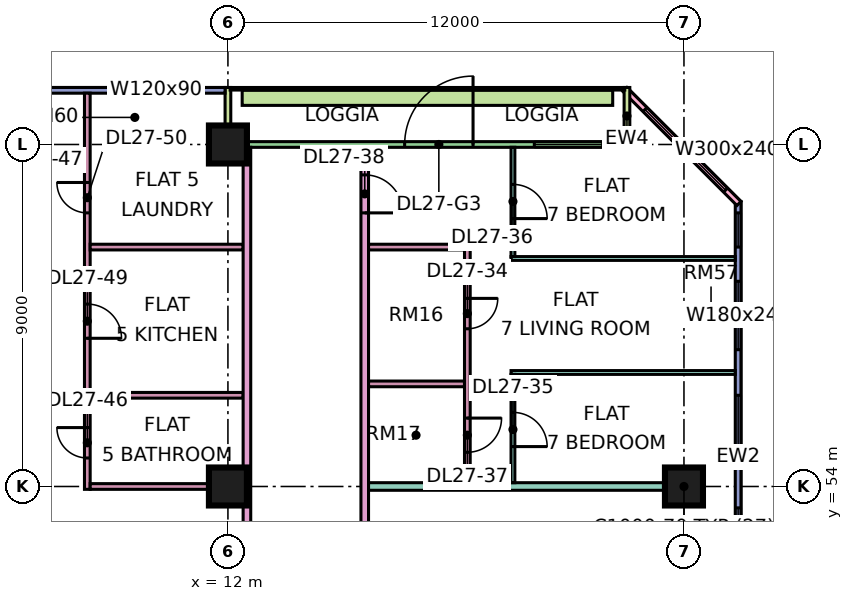
"""IFC4 building model, lengths in metres.
Left out: names, types, materials, properties, quantities, classifications, styles, units other than length and angle.
Written with IfcOpenShell. Run it as: python <this file> out.ifc"""

import sys

from ifc_helpers import new_model, si_unit, direction, frame, frame_2d, origin, origin_2d, place, context, subcontext, project, spatial, rectangle, extrude, element, fill, save


model = new_model("IFC4")
c1 = context("Model", 3, precision=1e-05, world=origin(), true_north=direction((0.0, 1.0)))
c2 = subcontext(c1, "Body", "Model", "MODEL_VIEW")
j1 = project(units=[si_unit("LENGTHUNIT", "METRE"), si_unit("PLANEANGLEUNIT", "RADIAN")], contexts=[c1])
p1 = place(None, origin())
s1 = spatial("IfcSite", under=j1, at=p1, CompositionType="ELEMENT")
p2 = place(p1, origin())
s2 = spatial("IfcBuilding", under=s1, at=p2, CompositionType="ELEMENT")
p3 = place(p2, frame((0.0, 0.0, 118.15)))
s3 = spatial("IfcBuildingStorey", under=s2, at=p3, CompositionType="ELEMENT", Elevation=118.15)
for number, where, z_axis, x_axis in (
    (1, (12.0, 54.0, 0.0), (0.0, 0.0, 1.0), (1.0, 0.0, 0.0)),
    (2, (12.0, 63.0, 0.0), (0.0, 0.0, 1.0), (1.0, 0.0, 0.0)),
    (3, (24.0, 54.0, 0.0), (0.0, 0.0, 1.0), (1.0, 0.0, 0.0)),
):
    element("IfcColumn", number, at=place(p3, frame(where, z_axis=z_axis, x_axis=x_axis)), inside=s3, PredefinedType="COLUMN", context=c2, shape_type="SweptSolid", body=[
        extrude(rectangle(XDim=1.0, YDim=1.0, at=origin_2d()), origin(), (0.0, 0.0, 1.0), 3.75),
    ])
p4 = place(p3, frame((25.425, 48.075, 0.0), z_axis=(0.0, 0.0, 1.0), x_axis=(0.0, 1.0, 0.0)))
e4 = element("IfcWall", 4, at=p4, inside=s3, PredefinedType="SOLIDWALL", context=c2, shape_type="SweptSolid", body=[
    extrude(rectangle(XDim=13.425, YDim=0.15, at=frame_2d((6.712, 0.0))), origin(), (0.0, 0.0, 1.0), 3.35),
])
p5 = place(p4, frame((0.562, 0.0, 0.45)))
e5 = element("IfcOpeningElement", 5, at=p5, cuts=e4, PredefinedType="OPENING", context=c2, shape_type="SweptSolid", body=[
    extrude(rectangle(XDim=4.8, YDim=2.4, at=frame_2d((2.4, 1.2))), frame((0.0, 0.085, 0.0), z_axis=(0.0, -1.0, 0.0), x_axis=(1.0, 0.0, 0.0)), (0.0, 0.0, 1.0), 0.17),
])
p6 = place(p4, frame((6.525, 0.0, 0.45)))
e6 = element("IfcOpeningElement", 6, at=p6, cuts=e4, PredefinedType="OPENING", context=c2, shape_type="SweptSolid", body=[
    extrude(rectangle(XDim=1.8, YDim=2.4, at=frame_2d((0.9, 1.2))), frame((0.0, 0.085, 0.0), z_axis=(0.0, -1.0, 0.0), x_axis=(1.0, 0.0, 0.0)), (0.0, 0.0, 1.0), 0.17),
])
p7 = place(p4, frame((9.525, 0.0, 0.45)))
e7 = element("IfcOpeningElement", 7, at=p7, cuts=e4, PredefinedType="OPENING", context=c2, shape_type="SweptSolid", body=[
    extrude(rectangle(XDim=1.8, YDim=2.4, at=frame_2d((0.9, 1.2))), frame((0.0, 0.085, 0.0), z_axis=(0.0, -1.0, 0.0), x_axis=(1.0, 0.0, 0.0)), (0.0, 0.0, 1.0), 0.17),
])
p8 = place(p4, frame((12.225, 0.0, 0.45)))
e8 = element("IfcOpeningElement", 8, at=p8, cuts=e4, PredefinedType="OPENING", context=c2, shape_type="SweptSolid", body=[
    extrude(rectangle(XDim=0.9, YDim=2.4, at=frame_2d((0.45, 1.2))), frame((0.0, 0.085, 0.0), z_axis=(0.0, -1.0, 0.0), x_axis=(1.0, 0.0, 0.0)), (0.0, 0.0, 1.0), 0.17),
])
p9 = place(p3, frame((25.447, 61.447, 0.0), z_axis=(0.0, 0.0, 1.0), x_axis=(-0.707106781187, 0.707106781187, 0.0)))
e9 = element("IfcWall", 9, at=p9, inside=s3, PredefinedType="SOLIDWALL", context=c2, shape_type="SweptSolid", body=[
    extrude(rectangle(XDim=4.243, YDim=0.15, at=frame_2d((2.121, 0.0))), origin(), (0.0, 0.0, 1.0), 3.35),
])
p10 = place(p9, frame((0.498, 0.0, 0.45)))
e10 = element("IfcOpeningElement", 10, at=p10, cuts=e9, PredefinedType="OPENING", context=c2, shape_type="SweptSolid", body=[
    extrude(rectangle(XDim=3.0, YDim=2.4, at=frame_2d((1.5, 1.2))), frame((0.0, 0.085, 0.0), z_axis=(0.0, -1.0, 0.0), x_axis=(1.0, 0.0, 0.0)), (0.0, 0.0, 1.0), 0.17),
])
p11 = place(p3, frame((22.425, 63.0, 0.0), z_axis=(0.0, 0.0, 1.0), x_axis=(-1.0, 0.0, 0.0)))
e11 = element("IfcWall", 11, at=p11, inside=s3, PredefinedType="SOLIDWALL", context=c2, shape_type="SweptSolid", body=[
    extrude(rectangle(XDim=10.35, YDim=0.15, at=frame_2d((5.175, 0.0))), origin(), (0.0, 0.0, 1.0), 3.35),
])
p12 = place(p11, frame((0.562, 0.0, 0.45)))
e12 = element("IfcOpeningElement", 12, at=p12, cuts=e11, PredefinedType="OPENING", context=c2, shape_type="SweptSolid", body=[
    extrude(rectangle(XDim=1.8, YDim=2.4, at=frame_2d((0.9, 1.2))), frame((0.0, 0.085, 0.0), z_axis=(0.0, -1.0, 0.0), x_axis=(1.0, 0.0, 0.0)), (0.0, 0.0, 1.0), 0.17),
])
p13 = place(p11, frame((3.975, 0.0, 0.0)))
e13 = element("IfcOpeningElement", 13, at=p13, cuts=e11, PredefinedType="OPENING", context=c2, shape_type="SweptSolid", body=[
    extrude(rectangle(XDim=1.8, YDim=2.4, at=frame_2d((0.9, 1.2))), frame((0.0, 0.085, 0.0), z_axis=(0.0, -1.0, 0.0), x_axis=(1.0, 0.0, 0.0)), (0.0, 0.0, 1.0), 0.17),
])
for number, where, z_axis, x_axis in (
    (14, (22.5, 64.5, 0.0), (0.0, 0.0, 1.0), (0.0, -1.0, 0.0)),
    (15, (12.0, 64.5, 0.0), (0.0, 0.0, 1.0), (0.0, -1.0, 0.0)),
):
    element("IfcWall", number, at=place(p3, frame(where, z_axis=z_axis, x_axis=x_axis)), inside=s3, PredefinedType="SOLIDWALL", context=c2, shape_type="SweptSolid", body=[
        extrude(rectangle(XDim=1.5, YDim=0.15, at=frame_2d((0.75, 0.0))), origin(), (0.0, 0.0, 1.0), 3.35),
    ])
p14 = place(p3, frame((11.925, 64.425, 0.0), z_axis=(0.0, 0.0, 1.0), x_axis=(-1.0, 0.0, 0.0)))
e16 = element("IfcWall", 16, at=p14, inside=s3, PredefinedType="SOLIDWALL", context=c2, shape_type="SweptSolid", body=[
    extrude(rectangle(XDim=10.425, YDim=0.15, at=frame_2d((5.212, 0.0))), origin(), (0.0, 0.0, 1.0), 3.35),
])
p15 = place(p14, frame((1.212, 0.0, 1.7)))
e17 = element("IfcOpeningElement", 17, at=p15, cuts=e16, PredefinedType="OPENING", context=c2, shape_type="SweptSolid", body=[
    extrude(rectangle(XDim=1.2, YDim=0.9, at=frame_2d((0.6, 0.45))), frame((0.0, 0.085, 0.0), z_axis=(0.0, -1.0, 0.0), x_axis=(1.0, 0.0, 0.0)), (0.0, 0.0, 1.0), 0.17),
])
p16 = place(p14, frame((6.125, 0.0, 0.45)))
e18 = element("IfcOpeningElement", 18, at=p16, cuts=e16, PredefinedType="OPENING", context=c2, shape_type="SweptSolid", body=[
    extrude(rectangle(XDim=3.0, YDim=2.4, at=frame_2d((1.5, 1.2))), frame((0.0, 0.085, 0.0), z_axis=(0.0, -1.0, 0.0), x_axis=(1.0, 0.0, 0.0)), (0.0, 0.0, 1.0), 0.17),
])
p17 = place(p3, frame((22.125, 64.229, 0.0), z_axis=(0.0, 0.0, 1.0), x_axis=(-1.0, 0.0, 0.0)))
e19 = element("IfcWall", 19, at=p17, inside=s3, PredefinedType="SOLIDWALL", context=c2, shape_type="SweptSolid", body=[
    extrude(rectangle(XDim=9.75, YDim=0.4, at=frame_2d((4.875, 0.0))), origin(), (0.0, 0.0, 1.0), 0.7),
])
p18 = place(p3, frame((8.3, 53.925, 0.0), z_axis=(0.0, 0.0, 1.0), x_axis=(0.0, 1.0, 0.0)))
e20 = element("IfcWall", 20, at=p18, inside=s3, PredefinedType="PARTITIONING", context=c2, shape_type="SweptSolid", body=[
    extrude(rectangle(XDim=10.425, YDim=0.15, at=frame_2d((5.212, 0.0))), origin(), (0.0, 0.0, 1.0), 3.35),
])
p19 = place(p18, frame((0.825, 0.0, 0.0)))
e21 = element("IfcOpeningElement", 21, at=p19, cuts=e20, PredefinedType="OPENING", context=c2, shape_type="SweptSolid", body=[
    extrude(rectangle(XDim=0.8, YDim=2.1, at=frame_2d((0.4, 1.05))), frame((0.0, 0.085, 0.0), z_axis=(0.0, -1.0, 0.0), x_axis=(1.0, 0.0, 0.0)), (0.0, 0.0, 1.0), 0.17),
])
p20 = place(p18, frame((3.975, 0.0, 0.0)))
e22 = element("IfcOpeningElement", 22, at=p20, cuts=e20, PredefinedType="OPENING", context=c2, shape_type="SweptSolid", body=[
    extrude(rectangle(XDim=0.9, YDim=2.1, at=frame_2d((0.45, 1.05))), frame((0.0, 0.085, 0.0), z_axis=(0.0, -1.0, 0.0), x_axis=(1.0, 0.0, 0.0)), (0.0, 0.0, 1.0), 0.17),
])
p21 = place(p18, frame((7.275, 0.0, 0.0)))
e23 = element("IfcOpeningElement", 23, at=p21, cuts=e20, PredefinedType="OPENING", context=c2, shape_type="SweptSolid", body=[
    extrude(rectangle(XDim=0.8, YDim=2.1, at=frame_2d((0.4, 1.05))), frame((0.0, 0.085, 0.0), z_axis=(0.0, -1.0, 0.0), x_axis=(1.0, 0.0, 0.0)), (0.0, 0.0, 1.0), 0.17),
])
for number, where, z_axis, x_axis in (
    (24, (8.375, 54.0, 0.0), (0.0, 0.0, 1.0), (1.0, 0.0, 0.0)),
    (25, (8.375, 56.4, 0.0), (0.0, 0.0, 1.0), (1.0, 0.0, 0.0)),
    (26, (8.375, 60.3, 0.0), (0.0, 0.0, 1.0), (1.0, 0.0, 0.0)),
):
    element("IfcWall", number, at=place(p3, frame(where, z_axis=z_axis, x_axis=x_axis)), inside=s3, PredefinedType="PARTITIONING", context=c2, shape_type="SweptSolid", body=[
        extrude(rectangle(XDim=4.025, YDim=0.15, at=frame_2d((2.012, 0.0))), origin(), (0.0, 0.0, 1.0), 3.35),
    ])
p22 = place(p3, frame((12.5, 20.0, 0.0), z_axis=(0.0, 0.0, 1.0), x_axis=(0.0, 1.0, 0.0)))
e27 = element("IfcWall", 27, at=p22, inside=s3, PredefinedType="PARTITIONING", context=c2, shape_type="SweptSolid", body=[
    extrude(rectangle(XDim=42.926, YDim=0.2, at=frame_2d((21.463, 0.0))), origin(), (0.0, 0.0, 1.0), 3.35),
])
p23 = place(p22, frame((28.65, 0.0, 0.0)))
e28 = element("IfcOpeningElement", 28, at=p23, cuts=e27, PredefinedType="OPENING", context=c2, shape_type="SweptSolid", body=[
    extrude(rectangle(XDim=1.0, YDim=2.1, at=frame_2d((0.5, 1.05))), frame((0.0, 0.11, 0.0), z_axis=(0.0, -1.0, 0.0), x_axis=(1.0, 0.0, 0.0)), (0.0, 0.0, 1.0), 0.22),
])
p24 = place(p22, frame((31.95, 0.0, 0.0)))
e29 = element("IfcOpeningElement", 29, at=p24, cuts=e27, PredefinedType="OPENING", context=c2, shape_type="SweptSolid", body=[
    extrude(rectangle(XDim=1.0, YDim=2.1, at=frame_2d((0.5, 1.05))), frame((0.0, 0.11, 0.0), z_axis=(0.0, -1.0, 0.0), x_axis=(1.0, 0.0, 0.0)), (0.0, 0.0, 1.0), 0.22),
])
p25 = place(p22, frame((0.6, 0.0, 0.0)))
e30 = element("IfcOpeningElement", 30, at=p25, cuts=e27, PredefinedType="OPENING", context=c2, shape_type="SweptSolid", body=[
    extrude(rectangle(XDim=1.2, YDim=2.1, at=frame_2d((0.6, 1.05))), frame((0.0, 0.11, 0.0), z_axis=(0.0, -1.0, 0.0), x_axis=(1.0, 0.0, 0.0)), (0.0, 0.0, 1.0), 0.22),
])
p26 = place(p22, frame((4.65, 0.0, 0.0)))
e31 = element("IfcOpeningElement", 31, at=p26, cuts=e27, PredefinedType="OPENING", context=c2, shape_type="SweptSolid", body=[
    extrude(rectangle(XDim=1.0, YDim=2.1, at=frame_2d((0.5, 1.05))), frame((0.0, 0.11, 0.0), z_axis=(0.0, -1.0, 0.0), x_axis=(1.0, 0.0, 0.0)), (0.0, 0.0, 1.0), 0.22),
])
p27 = place(p3, frame((15.6, 51.225, 0.0), z_axis=(0.0, 0.0, 1.0), x_axis=(0.0, 1.0, 0.0)))
e32 = element("IfcWall", 32, at=p27, inside=s3, PredefinedType="PARTITIONING", context=c2, shape_type="SweptSolid", body=[
    extrude(rectangle(XDim=11.701, YDim=0.2, at=frame_2d((5.851, 0.0))), origin(), (0.0, 0.0, 1.0), 3.35),
])
p28 = place(p27, frame((9.975, 0.0, 0.0)))
e33 = element("IfcOpeningElement", 33, at=p28, cuts=e32, PredefinedType="OPENING", context=c2, shape_type="SweptSolid", body=[
    extrude(rectangle(XDim=1.0, YDim=2.1, at=frame_2d((0.5, 1.05))), frame((0.0, 0.11, 0.0), z_axis=(0.0, -1.0, 0.0), x_axis=(1.0, 0.0, 0.0)), (0.0, 0.0, 1.0), 0.22),
])
p29 = place(p3, frame((15.7, 54.0, 0.0), z_axis=(0.0, 0.0, 1.0), x_axis=(1.0, 0.0, 0.0)))
e34 = element("IfcWall", 34, at=p29, inside=s3, PredefinedType="PARTITIONING", context=c2, shape_type="SweptSolid", body=[
    extrude(rectangle(XDim=8.3, YDim=0.2, at=frame_2d((4.15, 0.0))), origin(), (0.0, 0.0, 1.0), 3.35),
])
for number, where, z_axis, x_axis in (
    (35, (15.7, 56.7, 0.0), (0.0, 0.0, 1.0), (1.0, 0.0, 0.0)),
    (36, (15.7, 60.3, 0.0), (0.0, 0.0, 1.0), (1.0, 0.0, 0.0)),
):
    element("IfcWall", number, at=place(p3, frame(where, z_axis=z_axis, x_axis=x_axis)), inside=s3, PredefinedType="PARTITIONING", context=c2, shape_type="SweptSolid", body=[
        extrude(rectangle(XDim=2.525, YDim=0.15, at=frame_2d((1.263, 0.0))), origin(), (0.0, 0.0, 1.0), 3.35),
    ])
p30 = place(p3, frame((18.3, 54.1, 0.0), z_axis=(0.0, 0.0, 1.0), x_axis=(0.0, 1.0, 0.0)))
e37 = element("IfcWall", 37, at=p30, inside=s3, PredefinedType="PARTITIONING", context=c2, shape_type="SweptSolid", body=[
    extrude(rectangle(XDim=6.275, YDim=0.15, at=frame_2d((3.137, 0.0))), origin(), (0.0, 0.0, 1.0), 3.35),
])
p31 = place(p30, frame((4.05, 0.0, 0.0)))
e38 = element("IfcOpeningElement", 38, at=p31, cuts=e37, PredefinedType="OPENING", context=c2, shape_type="SweptSolid", body=[
    extrude(rectangle(XDim=0.8, YDim=2.1, at=frame_2d((0.4, 1.05))), frame((0.0, 0.085, 0.0), z_axis=(0.0, -1.0, 0.0), x_axis=(1.0, 0.0, 0.0)), (0.0, 0.0, 1.0), 0.17),
])
p32 = place(p30, frame((0.8, 0.0, 0.0)))
e39 = element("IfcOpeningElement", 39, at=p32, cuts=e37, PredefinedType="OPENING", context=c2, shape_type="SweptSolid", body=[
    extrude(rectangle(XDim=0.9, YDim=2.1, at=frame_2d((0.45, 1.05))), frame((0.0, 0.085, 0.0), z_axis=(0.0, -1.0, 0.0), x_axis=(1.0, 0.0, 0.0)), (0.0, 0.0, 1.0), 0.17),
])
for number, where, z_axis, x_axis in (
    (40, (19.45, 57.0, 0.0), (0.0, 0.0, 1.0), (1.0, 0.0, 0.0)),
    (41, (19.45, 60.0, 0.0), (0.0, 0.0, 1.0), (1.0, 0.0, 0.0)),
):
    element("IfcWall", number, at=place(p3, frame(where, z_axis=z_axis, x_axis=x_axis)), inside=s3, PredefinedType="PARTITIONING", context=c2, shape_type="SweptSolid", body=[
        extrude(rectangle(XDim=5.9, YDim=0.1, at=frame_2d((2.95, 0.0))), origin(), (0.0, 0.0, 1.0), 3.35),
    ])
p33 = place(p3, frame((19.5, 54.1, 0.0), z_axis=(0.0, 0.0, 1.0), x_axis=(0.0, 1.0, 0.0)))
e42 = element("IfcWall", 42, at=p33, inside=s3, PredefinedType="PARTITIONING", context=c2, shape_type="SweptSolid", body=[
    extrude(rectangle(XDim=2.85, YDim=0.1, at=frame_2d((1.425, 0.0))), origin(), (0.0, 0.0, 1.0), 3.35),
])
p34 = place(p33, frame((0.95, 0.0, 0.0)))
e43 = element("IfcOpeningElement", 43, at=p34, cuts=e42, PredefinedType="OPENING", context=c2, shape_type="SweptSolid", body=[
    extrude(rectangle(XDim=0.9, YDim=2.1, at=frame_2d((0.45, 1.05))), frame((0.0, 0.06, 0.0), z_axis=(0.0, -1.0, 0.0), x_axis=(1.0, 0.0, 0.0)), (0.0, 0.0, 1.0), 0.12),
])
p35 = place(p3, frame((19.5, 60.05, 0.0), z_axis=(0.0, 0.0, 1.0), x_axis=(0.0, 1.0, 0.0)))
e44 = element("IfcWall", 44, at=p35, inside=s3, PredefinedType="PARTITIONING", context=c2, shape_type="SweptSolid", body=[
    extrude(rectangle(XDim=2.876, YDim=0.1, at=frame_2d((1.438, 0.0))), origin(), (0.0, 0.0, 1.0), 3.35),
])
p36 = place(p35, frame((1.0, 0.0, 0.0)))
e45 = element("IfcOpeningElement", 45, at=p36, cuts=e44, PredefinedType="OPENING", context=c2, shape_type="SweptSolid", body=[
    extrude(rectangle(XDim=0.9, YDim=2.1, at=frame_2d((0.45, 1.05))), frame((0.0, 0.06, 0.0), z_axis=(0.0, -1.0, 0.0), x_axis=(1.0, 0.0, 0.0)), (0.0, 0.0, 1.0), 0.12),
])
p37 = place(p5, origin())
e46 = element("IfcWindow", 46, at=p37, inside=s3, PartitioningType="SINGLE_PANEL", PredefinedType="WINDOW", context=c2, shape_type="SweptSolid", body=[
    extrude(rectangle(XDim=4.8, YDim=2.4, at=frame_2d((2.4, 1.2))), frame((0.0, 0.03, 0.0), z_axis=(0.0, -1.0, 0.0), x_axis=(1.0, 0.0, 0.0)), (0.0, 0.0, 1.0), 0.06),
])
fill(e5, e46)
p38 = place(p6, origin())
e47 = element("IfcWindow", 47, at=p38, inside=s3, PartitioningType="SINGLE_PANEL", PredefinedType="WINDOW", context=c2, shape_type="SweptSolid", body=[
    extrude(rectangle(XDim=1.8, YDim=2.4, at=frame_2d((0.9, 1.2))), frame((0.0, 0.03, 0.0), z_axis=(0.0, -1.0, 0.0), x_axis=(1.0, 0.0, 0.0)), (0.0, 0.0, 1.0), 0.06),
])
fill(e6, e47)
p39 = place(p7, origin())
e48 = element("IfcWindow", 48, at=p39, inside=s3, PartitioningType="SINGLE_PANEL", PredefinedType="WINDOW", context=c2, shape_type="SweptSolid", body=[
    extrude(rectangle(XDim=1.8, YDim=2.4, at=frame_2d((0.9, 1.2))), frame((0.0, 0.03, 0.0), z_axis=(0.0, -1.0, 0.0), x_axis=(1.0, 0.0, 0.0)), (0.0, 0.0, 1.0), 0.06),
])
fill(e7, e48)
p40 = place(p8, origin())
e49 = element("IfcWindow", 49, at=p40, inside=s3, PartitioningType="SINGLE_PANEL", PredefinedType="WINDOW", context=c2, shape_type="SweptSolid", body=[
    extrude(rectangle(XDim=0.9, YDim=2.4, at=frame_2d((0.45, 1.2))), frame((0.0, 0.03, 0.0), z_axis=(0.0, -1.0, 0.0), x_axis=(1.0, 0.0, 0.0)), (0.0, 0.0, 1.0), 0.06),
])
fill(e8, e49)
p41 = place(p10, origin())
e50 = element("IfcWindow", 50, at=p41, inside=s3, PartitioningType="SINGLE_PANEL", PredefinedType="WINDOW", context=c2, shape_type="SweptSolid", body=[
    extrude(rectangle(XDim=3.0, YDim=2.4, at=frame_2d((1.5, 1.2))), frame((0.0, 0.03, 0.0), z_axis=(0.0, -1.0, 0.0), x_axis=(1.0, 0.0, 0.0)), (0.0, 0.0, 1.0), 0.06),
])
fill(e10, e50)
p42 = place(p12, origin())
e51 = element("IfcWindow", 51, at=p42, inside=s3, PartitioningType="SINGLE_PANEL", PredefinedType="WINDOW", context=c2, shape_type="SweptSolid", body=[
    extrude(rectangle(XDim=1.8, YDim=2.4, at=frame_2d((0.9, 1.2))), frame((0.0, 0.03, 0.0), z_axis=(0.0, -1.0, 0.0), x_axis=(1.0, 0.0, 0.0)), (0.0, 0.0, 1.0), 0.06),
])
fill(e12, e51)
p43 = place(p13, frame((1.8, 0.0, 0.0), z_axis=(0.0, 0.0, 1.0), x_axis=(-1.0, 0.0, 0.0)))
e52 = element("IfcDoor", 52, at=p43, inside=s3, OperationType="DOUBLE_DOOR_SINGLE_SWING", PredefinedType="DOOR", context=c2, shape_type="SweptSolid", body=[
    extrude(rectangle(XDim=1.8, YDim=2.4, at=frame_2d((0.9, 1.2))), frame((0.0, 0.025, 0.0), z_axis=(0.0, -1.0, 0.0), x_axis=(1.0, 0.0, 0.0)), (0.0, 0.0, 1.0), 0.05),
])
fill(e13, e52)
p44 = place(p15, origin())
e53 = element("IfcWindow", 53, at=p44, inside=s3, PartitioningType="SINGLE_PANEL", PredefinedType="WINDOW", context=c2, shape_type="SweptSolid", body=[
    extrude(rectangle(XDim=1.2, YDim=0.9, at=frame_2d((0.6, 0.45))), frame((0.0, 0.03, 0.0), z_axis=(0.0, -1.0, 0.0), x_axis=(1.0, 0.0, 0.0)), (0.0, 0.0, 1.0), 0.06),
])
fill(e17, e53)
p45 = place(p31, origin())
e54 = element("IfcDoor", 54, at=p45, inside=s3, OperationType="SINGLE_SWING_RIGHT", PredefinedType="DOOR", context=c2, shape_type="SweptSolid", body=[
    extrude(rectangle(XDim=0.8, YDim=2.1, at=frame_2d((0.4, 1.05))), frame((0.0, 0.025, 0.0), z_axis=(0.0, -1.0, 0.0), x_axis=(1.0, 0.0, 0.0)), (0.0, 0.0, 1.0), 0.05),
])
fill(e38, e54)
p46 = place(p34, frame((0.9, 0.0, 0.0), z_axis=(0.0, 0.0, 1.0), x_axis=(-1.0, 0.0, 0.0)))
e55 = element("IfcDoor", 55, at=p46, inside=s3, OperationType="SINGLE_SWING_LEFT", PredefinedType="DOOR", context=c2, shape_type="SweptSolid", body=[
    extrude(rectangle(XDim=0.9, YDim=2.1, at=frame_2d((0.45, 1.05))), frame((0.0, 0.025, 0.0), z_axis=(0.0, -1.0, 0.0), x_axis=(1.0, 0.0, 0.0)), (0.0, 0.0, 1.0), 0.05),
])
fill(e43, e55)
p47 = place(p36, frame((0.9, 0.0, 0.0), z_axis=(0.0, 0.0, 1.0), x_axis=(-1.0, 0.0, 0.0)))
e56 = element("IfcDoor", 56, at=p47, inside=s3, OperationType="SINGLE_SWING_LEFT", PredefinedType="DOOR", context=c2, shape_type="SweptSolid", body=[
    extrude(rectangle(XDim=0.9, YDim=2.1, at=frame_2d((0.45, 1.05))), frame((0.0, 0.025, 0.0), z_axis=(0.0, -1.0, 0.0), x_axis=(1.0, 0.0, 0.0)), (0.0, 0.0, 1.0), 0.05),
])
fill(e45, e56)
p48 = place(p32, origin())
e57 = element("IfcDoor", 57, at=p48, inside=s3, OperationType="SINGLE_SWING_RIGHT", PredefinedType="DOOR", context=c2, shape_type="SweptSolid", body=[
    extrude(rectangle(XDim=0.9, YDim=2.1, at=frame_2d((0.45, 1.05))), frame((0.0, 0.025, 0.0), z_axis=(0.0, -1.0, 0.0), x_axis=(1.0, 0.0, 0.0)), (0.0, 0.0, 1.0), 0.05),
])
fill(e39, e57)
p49 = place(p28, frame((1.0, 0.0, 0.0), z_axis=(0.0, 0.0, 1.0), x_axis=(-1.0, 0.0, 0.0)))
e58 = element("IfcDoor", 58, at=p49, inside=s3, OperationType="SINGLE_SWING_LEFT", PredefinedType="DOOR", context=c2, shape_type="SweptSolid", body=[
    extrude(rectangle(XDim=1.0, YDim=2.1, at=frame_2d((0.5, 1.05))), frame((0.0, 0.025, 0.0), z_axis=(0.0, -1.0, 0.0), x_axis=(1.0, 0.0, 0.0)), (0.0, 0.0, 1.0), 0.05),
])
fill(e33, e58)
p50 = place(p19, frame((0.8, 0.0, 0.0), z_axis=(0.0, 0.0, 1.0), x_axis=(-1.0, 0.0, 0.0)))
e59 = element("IfcDoor", 59, at=p50, inside=s3, OperationType="SINGLE_SWING_RIGHT", PredefinedType="DOOR", context=c2, shape_type="SweptSolid", body=[
    extrude(rectangle(XDim=0.8, YDim=2.1, at=frame_2d((0.4, 1.05))), frame((0.0, 0.025, 0.0), z_axis=(0.0, -1.0, 0.0), x_axis=(1.0, 0.0, 0.0)), (0.0, 0.0, 1.0), 0.05),
])
fill(e21, e59)
p51 = place(p20, frame((0.9, 0.0, 0.0), z_axis=(0.0, 0.0, 1.0), x_axis=(-1.0, 0.0, 0.0)))
e60 = element("IfcDoor", 60, at=p51, inside=s3, OperationType="SINGLE_SWING_LEFT", PredefinedType="DOOR", context=c2, shape_type="SweptSolid", body=[
    extrude(rectangle(XDim=0.9, YDim=2.1, at=frame_2d((0.45, 1.05))), frame((0.0, 0.025, 0.0), z_axis=(0.0, -1.0, 0.0), x_axis=(1.0, 0.0, 0.0)), (0.0, 0.0, 1.0), 0.05),
])
fill(e22, e60)
p52 = place(p21, frame((0.8, 0.0, 0.0), z_axis=(0.0, 0.0, 1.0), x_axis=(-1.0, 0.0, 0.0)))
e61 = element("IfcDoor", 61, at=p52, inside=s3, OperationType="SINGLE_SWING_RIGHT", PredefinedType="DOOR", context=c2, shape_type="SweptSolid", body=[
    extrude(rectangle(XDim=0.8, YDim=2.1, at=frame_2d((0.4, 1.05))), frame((0.0, 0.025, 0.0), z_axis=(0.0, -1.0, 0.0), x_axis=(1.0, 0.0, 0.0)), (0.0, 0.0, 1.0), 0.05),
])
fill(e23, e61)
save(model, sys.argv[1])
